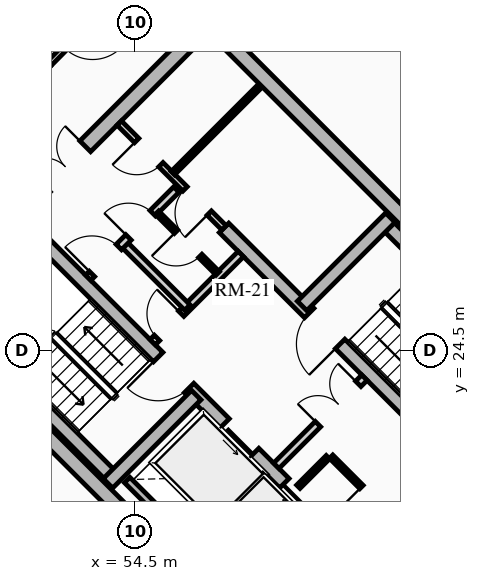
"""IFC4 building model, lengths in metres.
Left out: names, types, materials, properties, quantities, classifications, styles, units other than length and angle.
Written with IfcOpenShell. Run it as: python <this file> out.ifc"""

import sys

from ifc_helpers import new_model, si_unit, direction, frame, frame_2d, origin, place, context, subcontext, project, spatial, rectangle, extrude, source, transform, mapped, element, fill, save


model = new_model("IFC4")
c1 = context("Model", 3, precision=1e-05, world=origin(), true_north=direction((0.0, 1.0)))
c2 = subcontext(c1, "Body", "Model", "MODEL_VIEW")
j1 = project(units=[si_unit("LENGTHUNIT", "METRE"), si_unit("PLANEANGLEUNIT", "RADIAN")], contexts=[c1])
p1 = place(None, origin())
s1 = spatial("IfcSite", under=j1, at=p1, CompositionType="ELEMENT")
p2 = place(p1, origin())
s2 = spatial("IfcBuilding", under=s1, at=p2, CompositionType="ELEMENT")
p3 = place(p2, frame((0.0, 0.0, 222.85)))
s3 = spatial("IfcBuildingStorey", under=s2, at=p3, CompositionType="ELEMENT", Elevation=222.85)
for number, where, z_axis, x_axis in (
    (1, (58.702, 15.732, 0.0), (0.0, 0.0, 1.0), (-0.707, 0.707, 0.0)),
    (2, (66.268, 23.298, 0.0), (0.0, 0.0, 1.0), (-0.707, 0.707, 0.0)),
):
    element("IfcWall", number, at=place(p3, frame(where, z_axis=z_axis, x_axis=x_axis)), inside=s3, PredefinedType="SHEAR", context=c2, shape_type="SweptSolid", body=[
        extrude(rectangle(XDim=14.1, YDim=0.4, at=frame_2d((7.05, 0.0))), origin(), (0.0, 0.0, 1.0), 3.2),
    ])
p4 = place(p3, frame((58.561, 15.873, 0.0), z_axis=(0.0, 0.0, 1.0), x_axis=(0.707106781187, 0.707106781187, 0.0)))
e3 = element("IfcWall", 3, at=p4, inside=s3, PredefinedType="SHEAR", context=c2, shape_type="SweptSolid", body=[
    extrude(rectangle(XDim=10.7, YDim=0.4, at=frame_2d((5.35, 0.0))), origin(), (0.0, 0.0, 1.0), 3.2),
])
m1 = source(origin(), c2, "Body", "SweptSolid", [
    extrude(rectangle(XDim=1.5, YDim=2.02, at=frame_2d((0.75, 1.01))), frame((0.0, 0.21, 0.0), z_axis=(0.0, -1.0, 0.0), x_axis=(1.0, 0.0, 0.0)), (0.0, 0.0, 1.0), 0.42),
])
p5 = place(p4, frame((5.45, 0.0, 0.0)))
e4 = element("IfcOpeningElement", 4, at=p5, cuts=e3, PredefinedType="OPENING", context=c2, shape_type="MappedRepresentation", body=[
    mapped(m1, transform((0.0, 0.0, 0.0), x_axis=(1.0, 0.0, 0.0), y_axis=(0.0, 1.0, 0.0), z_axis=(0.0, 0.0, 1.0), scale=1.0)),
])
p6 = place(p3, frame((48.873, 25.561, 0.0), z_axis=(0.0, 0.0, 1.0), x_axis=(0.707106781187, 0.707106781187, 0.0)))
e5 = element("IfcWall", 5, at=p6, inside=s3, PredefinedType="SHEAR", context=c2, shape_type="SweptSolid", body=[
    extrude(rectangle(XDim=10.7, YDim=0.4, at=frame_2d((5.35, 0.0))), origin(), (0.0, 0.0, 1.0), 3.2),
])
p7 = place(p6, frame((4.6, 0.0, 0.0)))
e6 = element("IfcOpeningElement", 6, at=p7, cuts=e5, PredefinedType="OPENING", context=c2, shape_type="MappedRepresentation", body=[
    mapped(m1, transform((0.0, 0.0, 0.0), x_axis=(1.0, 0.0, 0.0), y_axis=(0.0, 1.0, 0.0), z_axis=(0.0, 0.0, 1.0), scale=1.0)),
])
p8 = place(p3, frame((61.06, 18.373, 0.0), z_axis=(0.0, 0.0, 1.0), x_axis=(-0.707106781187, 0.707106781187, 0.0)))
e7 = element("IfcWall", 7, at=p8, inside=s3, PredefinedType="SHEAR", context=c2, shape_type="SweptSolid", body=[
    extrude(rectangle(XDim=13.7, YDim=0.35, at=frame_2d((6.85, 0.0))), origin(), (0.0, 0.0, 1.0), 3.2),
])
m2 = source(origin(), c2, "Body", "SweptSolid", [
    extrude(rectangle(XDim=1.1, YDim=2.015, at=frame_2d((0.55, 1.007))), frame((0.0, 0.185, 0.0), z_axis=(0.0, -1.0, 0.0), x_axis=(1.0, 0.0, 0.0)), (0.0, 0.0, 1.0), 0.37),
])
p9 = place(p8, frame((4.85, 0.0, 0.0)))
e8 = element("IfcOpeningElement", 8, at=p9, cuts=e7, PredefinedType="OPENING", context=c2, shape_type="MappedRepresentation", body=[
    mapped(m2, transform((0.0, 0.0, 0.0), x_axis=(1.0, 0.0, 0.0), y_axis=(0.0, 1.0, 0.0), z_axis=(0.0, 0.0, 1.0), scale=1.0)),
])
p10 = place(p8, frame((0.625, 0.0, 0.0)))
e9 = element("IfcOpeningElement", 9, at=p10, cuts=e7, PredefinedType="OPENING", context=c2, shape_type="MappedRepresentation", body=[
    mapped(m2, transform((0.0, 0.0, 0.0), x_axis=(1.0, 0.0, 0.0), y_axis=(0.0, 1.0, 0.0), z_axis=(0.0, 0.0, 1.0), scale=1.0)),
])
p11 = place(p8, frame((2.625, 0.0, 0.0)))
e10 = element("IfcOpeningElement", 10, at=p11, cuts=e7, PredefinedType="OPENING", context=c2, shape_type="MappedRepresentation", body=[
    mapped(m2, transform((0.0, 0.0, 0.0), x_axis=(1.0, 0.0, 0.0), y_axis=(0.0, 1.0, 0.0), z_axis=(0.0, 0.0, 1.0), scale=1.0)),
])
m3 = source(origin(), c2, "Body", "SweptSolid", [
    extrude(rectangle(XDim=1.15, YDim=2.02, at=frame_2d((0.575, 1.01))), frame((0.0, 0.185, 0.0), z_axis=(0.0, -1.0, 0.0), x_axis=(1.0, 0.0, 0.0)), (0.0, 0.0, 1.0), 0.37),
])
p12 = place(p8, frame((7.27, 0.0, 0.0)))
e11 = element("IfcOpeningElement", 11, at=p12, cuts=e7, PredefinedType="OPENING", context=c2, shape_type="MappedRepresentation", body=[
    mapped(m3, transform((0.0, 0.0, 0.0), x_axis=(1.0, 0.0, 0.0), y_axis=(0.0, 1.0, 0.0), z_axis=(0.0, 0.0, 1.0), scale=1.0)),
])
p13 = place(p3, frame((63.627, 20.94, 0.0), z_axis=(0.0, 0.0, 1.0), x_axis=(-0.707119496762, 0.707094065383, 0.0)))
e12 = element("IfcWall", 12, at=p13, inside=s3, PredefinedType="SHEAR", context=c2, shape_type="SweptSolid", body=[
    extrude(rectangle(XDim=9.6, YDim=0.35, at=frame_2d((4.8, 0.0))), origin(), (0.0, 0.0, 1.0), 3.2),
])
p14 = place(p13, frame((5.28, 0.0, 0.0)))
e13 = element("IfcOpeningElement", 13, at=p14, cuts=e12, PredefinedType="OPENING", context=c2, shape_type="MappedRepresentation", body=[
    mapped(m3, transform((0.0, 0.0, 0.0), x_axis=(1.0, 0.0, 0.0), y_axis=(0.0, 1.0, 0.0), z_axis=(0.0, 0.0, 1.0), scale=1.0)),
])
p15 = place(p3, frame((53.922, 21.141, 0.0), z_axis=(0.0, 0.0, 1.0), x_axis=(-0.707106781187, 0.707106781187, 0.0)))
e14 = element("IfcWall", 14, at=p15, inside=s3, PredefinedType="SHEAR", context=c2, shape_type="SweptSolid", body=[
    extrude(rectangle(XDim=6.695, YDim=0.35, at=frame_2d((3.348, 0.0))), origin(), (0.0, 0.0, 1.0), 3.2),
])
p16 = place(p3, frame((53.784, 21.003, 0.0), z_axis=(0.0, 0.0, 1.0), x_axis=(0.707106781187, 0.707106781187, 0.0)))
e15 = element("IfcWall", 15, at=p16, inside=s3, PredefinedType="SHEAR", context=c2, shape_type="SweptSolid", body=[
    extrude(rectangle(XDim=3.285, YDim=0.35, at=frame_2d((1.643, 0.0))), origin(), (0.0, 0.0, 1.0), 3.2),
])
p17 = place(p3, frame((65.812, 23.125, 0.0), z_axis=(0.0, 0.0, 1.0), x_axis=(-0.707106781187, 0.707106781187, 0.0)))
e16 = element("IfcWall", 16, at=p17, inside=s3, PredefinedType="SHEAR", context=c2, shape_type="SweptSolid", body=[
    extrude(rectangle(XDim=6.695, YDim=0.35, at=frame_2d((3.348, 0.0))), origin(), (0.0, 0.0, 1.0), 3.2),
])
p18 = place(p3, frame((58.893, 25.674, 0.0), z_axis=(0.0, 0.0, 1.0), x_axis=(0.707106781187, 0.707106781187, 0.0)))
e17 = element("IfcWall", 17, at=p18, inside=s3, PredefinedType="SHEAR", context=c2, shape_type="SweptSolid", body=[
    extrude(rectangle(XDim=3.285, YDim=0.35, at=frame_2d((1.643, 0.0))), origin(), (0.0, 0.0, 1.0), 3.2),
])
p19 = place(p3, frame((55.888, 19.069, 0.0), z_axis=(0.0, 0.0, 1.0), x_axis=(0.707106781187, 0.707106781187, 0.0)))
e18 = element("IfcWall", 18, at=p19, inside=s3, PredefinedType="SHEAR", context=c2, shape_type="SweptSolid", body=[
    extrude(rectangle(XDim=2.97, YDim=0.2, at=frame_2d((1.485, 0.0))), origin(), (0.0, 0.0, 1.0), 3.2),
])
p20 = place(p3, frame((56.015, 19.366, 0.0), z_axis=(0.0, 0.0, 1.0), x_axis=(-0.707106781187, 0.707106781187, 0.0)))
e19 = element("IfcWall", 19, at=p20, inside=s3, PredefinedType="SHEAR", context=c2, shape_type="SweptSolid", body=[
    extrude(rectangle(XDim=2.44, YDim=0.2, at=frame_2d((1.22, 0.0))), origin(), (0.0, 0.0, 1.0), 3.2),
])
p21 = place(p3, frame((58.214, 21.467, 0.0), z_axis=(0.0, 0.0, 1.0), x_axis=(0.707106781187, 0.707106781187, 0.0)))
e20 = element("IfcWall", 20, at=p21, inside=s3, PredefinedType="PARTITIONING", context=c2, shape_type="SweptSolid", body=[
    extrude(rectangle(XDim=3.28, YDim=0.2, at=frame_2d((1.64, 0.0))), origin(), (0.0, 0.0, 1.0), 2.975),
])
m4 = source(origin(), c2, "Body", "SweptSolid", [
    extrude(rectangle(XDim=1.5, YDim=2.02, at=frame_2d((0.75, 1.01))), frame((0.0, 0.11, 0.0), z_axis=(0.0, -1.0, 0.0), x_axis=(1.0, 0.0, 0.0)), (0.0, 0.0, 1.0), 0.22),
])
p22 = place(p21, frame((1.55, 0.0, 0.0)))
e21 = element("IfcOpeningElement", 21, at=p22, cuts=e20, PredefinedType="OPENING", context=c2, shape_type="MappedRepresentation", body=[
    mapped(m4, transform((0.0, 0.0, 0.0), x_axis=(1.0, 0.0, 0.0), y_axis=(0.0, 1.0, 0.0), z_axis=(0.0, 0.0, 1.0), scale=1.0)),
])
p23 = place(p3, frame((54.961, 24.719, 0.0), z_axis=(0.0, 0.0, 1.0), x_axis=(0.707106781187, 0.707106781187, 0.0)))
e22 = element("IfcWall", 22, at=p23, inside=s3, PredefinedType="PARTITIONING", context=c2, shape_type="SweptSolid", body=[
    extrude(rectangle(XDim=3.28, YDim=0.2, at=frame_2d((1.64, 0.0))), origin(), (0.0, 0.0, 1.0), 2.975),
])
m5 = source(origin(), c2, "Body", "SweptSolid", [
    extrude(rectangle(XDim=0.9, YDim=2.005, at=frame_2d((0.45, 1.002))), frame((0.0, 0.11, 0.0), z_axis=(0.0, -1.0, 0.0), x_axis=(1.0, 0.0, 0.0)), (0.0, 0.0, 1.0), 0.22),
])
p24 = place(p23, frame((0.16, 0.0, 0.0)))
e23 = element("IfcOpeningElement", 23, at=p24, cuts=e22, PredefinedType="OPENING", context=c2, shape_type="MappedRepresentation", body=[
    mapped(m5, transform((0.0, 0.0, 0.0), x_axis=(1.0, 0.0, 0.0), y_axis=(0.0, 1.0, 0.0), z_axis=(0.0, 0.0, 1.0), scale=1.0)),
])
p25 = place(p3, frame((55.874, 25.631, 0.0), z_axis=(0.0, 0.0, 1.0), x_axis=(-0.707157639372, 0.707055919343, 0.0)))
e24 = element("IfcWall", 24, at=p25, inside=s3, PredefinedType="PARTITIONING", context=c2, shape_type="SweptSolid", body=[
    extrude(rectangle(XDim=2.4, YDim=0.2, at=frame_2d((1.2, 0.0))), origin(), (0.0, 0.0, 1.0), 2.975),
])
p26 = place(p3, frame((53.264, 26.416, 0.0), z_axis=(0.0, 0.0, 1.0), x_axis=(0.707106781187, 0.707106781187, 0.0)))
e25 = element("IfcWall", 25, at=p26, inside=s3, PredefinedType="PARTITIONING", context=c2, shape_type="SweptSolid", body=[
    extrude(rectangle(XDim=3.28, YDim=0.2, at=frame_2d((1.64, 0.0))), origin(), (0.0, 0.0, 1.0), 2.975),
])
m6 = source(origin(), c2, "Body", "SweptSolid", [
    extrude(rectangle(XDim=1.0, YDim=2.015, at=frame_2d((0.5, 1.007))), frame((0.0, 0.11, 0.0), z_axis=(0.0, -1.0, 0.0), x_axis=(1.0, 0.0, 0.0)), (0.0, 0.0, 1.0), 0.22),
])
p27 = place(p26, frame((0.14, 0.0, 0.0)))
e26 = element("IfcOpeningElement", 26, at=p27, cuts=e25, PredefinedType="OPENING", context=c2, shape_type="MappedRepresentation", body=[
    mapped(m6, transform((0.0, 0.0, 0.0), x_axis=(1.0, 0.0, 0.0), y_axis=(0.0, 1.0, 0.0), z_axis=(0.0, 0.0, 1.0), scale=1.0)),
])
p28 = place(p26, frame((1.5, 0.0, 0.0)))
e27 = element("IfcOpeningElement", 27, at=p28, cuts=e25, PredefinedType="OPENING", context=c2, shape_type="MappedRepresentation", body=[
    mapped(m5, transform((0.0, 0.0, 0.0), x_axis=(1.0, 0.0, 0.0), y_axis=(0.0, 1.0, 0.0), z_axis=(0.0, 0.0, 1.0), scale=1.0)),
])
p29 = place(p3, frame((61.835, 19.529, 0.0), z_axis=(0.0, 0.0, 1.0), x_axis=(-0.707146413884, 0.707067146267, 0.0)))
e28 = element("IfcWall", 28, at=p29, inside=s3, PredefinedType="PARTITIONING", context=c2, shape_type="SweptSolid", body=[
    extrude(rectangle(XDim=3.08, YDim=0.125, at=frame_2d((1.54, 0.0))), origin(), (0.0, 0.0, 1.0), 2.975),
])
m7 = source(origin(), c2, "Body", "SweptSolid", [
    extrude(rectangle(XDim=0.9, YDim=2.005, at=frame_2d((0.45, 1.002))), frame((0.0, 0.073, 0.0), z_axis=(0.0, -1.0, 0.0), x_axis=(1.0, 0.0, 0.0)), (0.0, 0.0, 1.0), 0.145),
])
p30 = place(p29, frame((1.05, 0.0, 0.0)))
e29 = element("IfcOpeningElement", 29, at=p30, cuts=e28, PredefinedType="OPENING", context=c2, shape_type="MappedRepresentation", body=[
    mapped(m7, transform((0.0, 0.0, 0.0), x_axis=(1.0, 0.0, 0.0), y_axis=(0.0, 1.0, 0.0), z_axis=(0.0, 0.0, 1.0), scale=1.0)),
])
p31 = place(p3, frame((58.794, 20.915, 0.0), z_axis=(0.0, 0.0, 1.0), x_axis=(0.707106781187, 0.707106781187, 0.0)))
e30 = element("IfcWall", 30, at=p31, inside=s3, PredefinedType="PARTITIONING", context=c2, shape_type="SweptSolid", body=[
    extrude(rectangle(XDim=1.1, YDim=0.125, at=frame_2d((0.55, 0.0))), origin(), (0.0, 0.0, 1.0), 2.975),
])
p32 = place(p3, frame((56.673, 26.529, 0.0), z_axis=(0.0, 0.0, 1.0), x_axis=(-0.707052764397, 0.70716079385, 0.0)))
e31 = element("IfcWall", 31, at=p32, inside=s3, PredefinedType="PARTITIONING", context=c2, shape_type="SweptSolid", body=[
    extrude(rectangle(XDim=2.26, YDim=0.125, at=frame_2d((1.13, 0.0))), origin(), (0.0, 0.0, 1.0), 2.975),
])
p33 = place(p32, frame((0.65, 0.0, 0.0)))
e32 = element("IfcOpeningElement", 32, at=p33, cuts=e31, PredefinedType="OPENING", context=c2, shape_type="MappedRepresentation", body=[
    mapped(m7, transform((0.0, 0.0, 0.0), x_axis=(1.0, 0.0, 0.0), y_axis=(0.0, 1.0, 0.0), z_axis=(0.0, 0.0, 1.0), scale=1.0)),
])
p34 = place(p3, frame((56.839, 27.728, 0.0), z_axis=(0.0, 0.0, 1.0), x_axis=(-0.707106781187, 0.707106781187, 0.0)))
e33 = element("IfcWall", 33, at=p34, inside=s3, PredefinedType="PARTITIONING", context=c2, shape_type="SweptSolid", body=[
    extrude(rectangle(XDim=3.9, YDim=0.16, at=frame_2d((1.95, 0.0))), origin(), (0.0, 0.0, 1.0), 2.975),
])
m8 = source(origin(), c2, "Body", "SweptSolid", [
    extrude(rectangle(XDim=0.9, YDim=2.005, at=frame_2d((0.45, 1.002))), frame((0.0, 0.09, 0.0), z_axis=(0.0, -1.0, 0.0), x_axis=(1.0, 0.0, 0.0)), (0.0, 0.0, 1.0), 0.18),
])
p35 = place(p34, frame((0.55, 0.0, 0.0)))
e34 = element("IfcOpeningElement", 34, at=p35, cuts=e33, PredefinedType="OPENING", context=c2, shape_type="MappedRepresentation", body=[
    mapped(m8, transform((0.0, 0.0, 0.0), x_axis=(1.0, 0.0, 0.0), y_axis=(0.0, 1.0, 0.0), z_axis=(0.0, 0.0, 1.0), scale=1.0)),
])
p36 = place(p34, frame((2.35, 0.0, 0.0)))
e35 = element("IfcOpeningElement", 35, at=p36, cuts=e33, PredefinedType="OPENING", context=c2, shape_type="MappedRepresentation", body=[
    mapped(m8, transform((0.0, 0.0, 0.0), x_axis=(1.0, 0.0, 0.0), y_axis=(0.0, 1.0, 0.0), z_axis=(0.0, 0.0, 1.0), scale=1.0)),
])
p37 = place(p3, frame((55.492, 29.167, 0.0), z_axis=(0.0, 0.0, 1.0), x_axis=(0.707144688645, 0.707068871696, 0.0)))
e36 = element("IfcWall", 36, at=p37, inside=s3, PredefinedType="PARTITIONING", context=c2, shape_type="SweptSolid", body=[
    extrude(rectangle(XDim=3.22, YDim=0.125, at=frame_2d((1.61, 0.0))), origin(), (0.0, 0.0, 1.0), 2.512),
])
p38 = place(p3, frame((54.506, 34.344, 0.0), z_axis=(0.0, 0.0, 1.0), x_axis=(-0.703053402247, -0.711137056824, 0.0)))
e37 = element("IfcWall", 37, at=p38, inside=s3, PredefinedType="PARTITIONING", context=c2, shape_type="SweptSolid", body=[
    extrude(rectangle(XDim=3.262, YDim=0.15, at=frame_2d((1.631, 0.0))), origin(), (0.0, 0.0, 1.0), 2.612),
])
m9 = source(origin(), c2, "Body", "SweptSolid", [
    extrude(rectangle(XDim=1.05, YDim=2.015, at=frame_2d((0.525, 1.007))), frame((0.0, 0.085, 0.0), z_axis=(0.0, -1.0, 0.0), x_axis=(1.0, 0.0, 0.0)), (0.0, 0.0, 1.0), 0.17),
])
p39 = place(p38, frame((1.599, 0.0, 0.0)))
e38 = element("IfcOpeningElement", 38, at=p39, cuts=e37, PredefinedType="OPENING", context=c2, shape_type="MappedRepresentation", body=[
    mapped(m9, transform((0.0, 0.0, 0.0), x_axis=(1.0, 0.0, 0.0), y_axis=(0.0, 1.0, 0.0), z_axis=(0.0, 0.0, 1.0), scale=1.0)),
])
m10 = source(origin(), c2, "Body", "SweptSolid", [
    extrude(rectangle(XDim=1.1, YDim=2.015, at=frame_2d((0.55, 1.007))), frame((0.0, 0.025, 0.0), z_axis=(0.0, -1.0, 0.0), x_axis=(1.0, 0.0, 0.0)), (0.0, 0.0, 1.0), 0.05),
])
p40 = place(p9, origin())
e39 = element("IfcDoor", 39, at=p40, inside=s3, OperationType="SLIDING_TO_LEFT", PredefinedType="DOOR", context=c2, shape_type="MappedRepresentation", body=[
    mapped(m10, transform((0.0, 0.0, 0.0), x_axis=(1.0, 0.0, 0.0), y_axis=(0.0, 1.0, 0.0), z_axis=(0.0, 0.0, 1.0), scale=1.0)),
])
fill(e8, e39)
p41 = place(p11, origin())
e40 = element("IfcDoor", 40, at=p41, inside=s3, OperationType="SLIDING_TO_RIGHT", PredefinedType="DOOR", context=c2, shape_type="MappedRepresentation", body=[
    mapped(m10, transform((0.0, 0.0, 0.0), x_axis=(1.0, 0.0, 0.0), y_axis=(0.0, 1.0, 0.0), z_axis=(0.0, 0.0, 1.0), scale=1.0)),
])
fill(e10, e40)
m11 = source(origin(), c2, "Body", "SweptSolid", [
    extrude(rectangle(XDim=1.15, YDim=2.02, at=frame_2d((0.575, 1.01))), frame((0.0, 0.025, 0.0), z_axis=(0.0, -1.0, 0.0), x_axis=(1.0, 0.0, 0.0)), (0.0, 0.0, 1.0), 0.05),
])
p42 = place(p12, origin())
e41 = element("IfcDoor", 41, at=p42, inside=s3, OperationType="SINGLE_SWING_RIGHT", PredefinedType="DOOR", context=c2, shape_type="MappedRepresentation", body=[
    mapped(m11, transform((0.0, 0.0, 0.0), x_axis=(1.0, 0.0, 0.0), y_axis=(0.0, 1.0, 0.0), z_axis=(0.0, 0.0, 1.0), scale=1.0)),
])
fill(e11, e41)
p43 = place(p14, origin())
e42 = element("IfcDoor", 42, at=p43, inside=s3, OperationType="SINGLE_SWING_LEFT", PredefinedType="DOOR", context=c2, shape_type="MappedRepresentation", body=[
    mapped(m11, transform((0.0, 0.0, 0.0), x_axis=(1.0, 0.0, 0.0), y_axis=(0.0, 1.0, 0.0), z_axis=(0.0, 0.0, 1.0), scale=1.0)),
])
fill(e13, e42)
m12 = source(origin(), c2, "Body", "SweptSolid", [
    extrude(rectangle(XDim=1.5, YDim=2.02, at=frame_2d((0.75, 1.01))), frame((0.0, 0.025, 0.0), z_axis=(0.0, -1.0, 0.0), x_axis=(1.0, 0.0, 0.0)), (0.0, 0.0, 1.0), 0.05),
])
p44 = place(p7, origin())
e43 = element("IfcDoor", 43, at=p44, inside=s3, OperationType="DOUBLE_DOOR_SINGLE_SWING", PredefinedType="DOOR", context=c2, shape_type="MappedRepresentation", body=[
    mapped(m12, transform((0.0, 0.0, 0.0), x_axis=(1.0, 0.0, 0.0), y_axis=(0.0, 1.0, 0.0), z_axis=(0.0, 0.0, 1.0), scale=1.0)),
])
fill(e6, e43)
p45 = place(p22, origin())
e44 = element("IfcDoor", 44, at=p45, inside=s3, OperationType="DOUBLE_DOOR_SINGLE_SWING", PredefinedType="DOOR", context=c2, shape_type="MappedRepresentation", body=[
    mapped(m12, transform((0.0, 0.0, 0.0), x_axis=(1.0, 0.0, 0.0), y_axis=(0.0, 1.0, 0.0), z_axis=(0.0, 0.0, 1.0), scale=1.0)),
])
fill(e21, e44)
m13 = source(origin(), c2, "Body", "SweptSolid", [
    extrude(rectangle(XDim=0.9, YDim=2.005, at=frame_2d((0.45, 1.002))), frame((0.0, 0.025, 0.0), z_axis=(0.0, -1.0, 0.0), x_axis=(1.0, 0.0, 0.0)), (0.0, 0.0, 1.0), 0.05),
])
p46 = place(p24, origin())
e45 = element("IfcDoor", 45, at=p46, inside=s3, OperationType="SINGLE_SWING_RIGHT", PredefinedType="DOOR", context=c2, shape_type="MappedRepresentation", body=[
    mapped(m13, transform((0.0, 0.0, 0.0), x_axis=(1.0, 0.0, 0.0), y_axis=(0.0, 1.0, 0.0), z_axis=(0.0, 0.0, 1.0), scale=1.0)),
])
fill(e23, e45)
m14 = source(origin(), c2, "Body", "SweptSolid", [
    extrude(rectangle(XDim=1.0, YDim=2.015, at=frame_2d((0.5, 1.007))), frame((0.0, 0.025, 0.0), z_axis=(0.0, -1.0, 0.0), x_axis=(1.0, 0.0, 0.0)), (0.0, 0.0, 1.0), 0.05),
])
p47 = place(p27, origin())
e46 = element("IfcDoor", 46, at=p47, inside=s3, OperationType="SINGLE_SWING_LEFT", PredefinedType="DOOR", context=c2, shape_type="MappedRepresentation", body=[
    mapped(m14, transform((0.0, 0.0, 0.0), x_axis=(1.0, 0.0, 0.0), y_axis=(0.0, 1.0, 0.0), z_axis=(0.0, 0.0, 1.0), scale=1.0)),
])
fill(e26, e46)
p48 = place(p30, origin())
e47 = element("IfcDoor", 47, at=p48, inside=s3, OperationType="SINGLE_SWING_RIGHT", PredefinedType="DOOR", context=c2, shape_type="MappedRepresentation", body=[
    mapped(m13, transform((0.0, 0.0, 0.0), x_axis=(1.0, 0.0, 0.0), y_axis=(0.0, 1.0, 0.0), z_axis=(0.0, 0.0, 1.0), scale=1.0)),
])
fill(e29, e47)
p49 = place(p28, origin())
e48 = element("IfcDoor", 48, at=p49, inside=s3, OperationType="SINGLE_SWING_LEFT", PredefinedType="DOOR", context=c2, shape_type="MappedRepresentation", body=[
    mapped(m13, transform((0.0, 0.0, 0.0), x_axis=(1.0, 0.0, 0.0), y_axis=(0.0, 1.0, 0.0), z_axis=(0.0, 0.0, 1.0), scale=1.0)),
])
fill(e27, e48)
p50 = place(p33, origin())
e49 = element("IfcDoor", 49, at=p50, inside=s3, OperationType="SINGLE_SWING_RIGHT", PredefinedType="DOOR", context=c2, shape_type="MappedRepresentation", body=[
    mapped(m13, transform((0.0, 0.0, 0.0), x_axis=(1.0, 0.0, 0.0), y_axis=(0.0, 1.0, 0.0), z_axis=(0.0, 0.0, 1.0), scale=1.0)),
])
fill(e32, e49)
p51 = place(p35, origin())
e50 = element("IfcDoor", 50, at=p51, inside=s3, OperationType="SINGLE_SWING_LEFT", PredefinedType="DOOR", context=c2, shape_type="MappedRepresentation", body=[
    mapped(m13, transform((0.0, 0.0, 0.0), x_axis=(1.0, 0.0, 0.0), y_axis=(0.0, 1.0, 0.0), z_axis=(0.0, 0.0, 1.0), scale=1.0)),
])
fill(e34, e50)
p52 = place(p36, origin())
e51 = element("IfcDoor", 51, at=p52, inside=s3, OperationType="SINGLE_SWING_RIGHT", PredefinedType="DOOR", context=c2, shape_type="MappedRepresentation", body=[
    mapped(m13, transform((0.0, 0.0, 0.0), x_axis=(1.0, 0.0, 0.0), y_axis=(0.0, 1.0, 0.0), z_axis=(0.0, 0.0, 1.0), scale=1.0)),
])
fill(e35, e51)
save(model, sys.argv[1])
